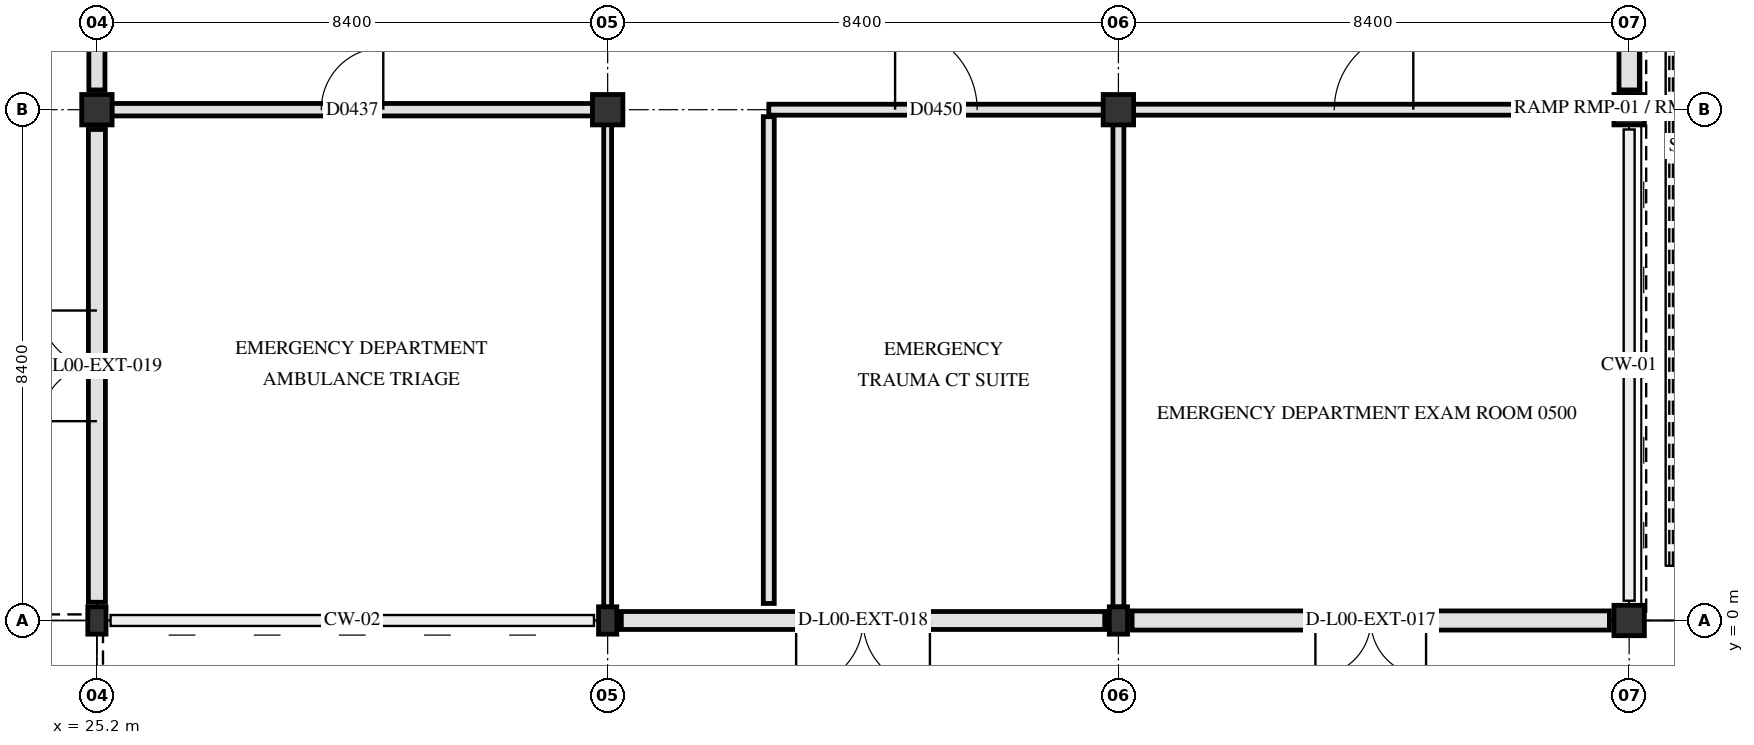
"""IFC4 building model, lengths in metres.
Left out: names, types, materials, properties, quantities, classifications, styles, units other than length and angle.
Written with IfcOpenShell. Run it as: python <this file> out.ifc"""

import sys

from ifc_helpers import new_model, si_unit, direction, frame, frame_2d, origin, origin_2d, place, context, subcontext, project, spatial, rectangle, i_section, extrude, element, fill, save


model = new_model("IFC4")
c1 = context("Model", 3, precision=1e-05, world=origin(), true_north=direction((0.0, 1.0)))
c2 = subcontext(c1, "Body", "Model", "MODEL_VIEW")
j1 = project(units=[si_unit("LENGTHUNIT", "METRE"), si_unit("PLANEANGLEUNIT", "RADIAN")], contexts=[c1])
p1 = place(None, origin())
s1 = spatial("IfcSite", under=j1, at=p1, CompositionType="ELEMENT")
p2 = place(p1, origin())
s2 = spatial("IfcBuilding", under=s1, at=p2, CompositionType="ELEMENT")
p3 = place(p2, origin())
s3 = spatial("IfcBuildingStorey", under=s2, at=p3, CompositionType="ELEMENT", Elevation=0.0)
p4 = place(p3, frame((25.2, 0.0, 0.0), z_axis=(0.0, 0.0, 1.0), x_axis=(1.0, 0.0, 0.0)))
e1 = element("IfcColumn", 1, at=p4, inside=s3, PredefinedType="COLUMN", context=c2, shape_type="SweptSolid", body=[
    extrude(i_section(OverallWidth=0.3, OverallDepth=0.45, WebThickness=0.014, FlangeThickness=0.026, FilletRadius=0.027, at=origin_2d()), origin(), (0.0, 0.0, 1.0), 4.8),
])
p5 = place(p3, frame((25.2, 8.4, 0.0), z_axis=(0.0, 0.0, 1.0), x_axis=(1.0, 0.0, 0.0)))
e2 = element("IfcColumn", 2, at=p5, inside=s3, PredefinedType="COLUMN", context=c2, shape_type="SweptSolid", body=[
    extrude(rectangle(XDim=0.5, YDim=0.5, at=origin_2d()), origin(), (0.0, 0.0, 1.0), 4.8),
])
p6 = place(p3, frame((33.6, 0.0, 0.0), z_axis=(0.0, 0.0, 1.0), x_axis=(1.0, 0.0, 0.0)))
e3 = element("IfcColumn", 3, at=p6, inside=s3, PredefinedType="COLUMN", context=c2, shape_type="SweptSolid", body=[
    extrude(i_section(OverallWidth=0.3, OverallDepth=0.45, WebThickness=0.014, FlangeThickness=0.026, FilletRadius=0.027, at=origin_2d()), origin(), (0.0, 0.0, 1.0), 4.8),
])
p7 = place(p3, frame((33.6, 8.4, 0.0), z_axis=(0.0, 0.0, 1.0), x_axis=(1.0, 0.0, 0.0)))
e4 = element("IfcColumn", 4, at=p7, inside=s3, PredefinedType="COLUMN", context=c2, shape_type="SweptSolid", body=[
    extrude(rectangle(XDim=0.5, YDim=0.5, at=origin_2d()), origin(), (0.0, 0.0, 1.0), 4.8),
])
p8 = place(p3, frame((42.0, 0.0, 0.0), z_axis=(0.0, 0.0, 1.0), x_axis=(1.0, 0.0, 0.0)))
e5 = element("IfcColumn", 5, at=p8, inside=s3, PredefinedType="COLUMN", context=c2, shape_type="SweptSolid", body=[
    extrude(i_section(OverallWidth=0.3, OverallDepth=0.45, WebThickness=0.014, FlangeThickness=0.026, FilletRadius=0.027, at=origin_2d()), origin(), (0.0, 0.0, 1.0), 4.8),
])
for number, where, z_axis, x_axis in (
    (6, (42.0, 8.4, 0.0), (0.0, 0.0, 1.0), (1.0, 0.0, 0.0)),
    (7, (50.4, 0.0, 0.0), (0.0, 0.0, 1.0), (1.0, 0.0, 0.0)),
    (8, (50.4, 8.4, 0.0), (0.0, 0.0, 1.0), (1.0, 0.0, 0.0)),
):
    element("IfcColumn", number, at=place(p3, frame(where, z_axis=z_axis, x_axis=x_axis)), inside=s3, PredefinedType="COLUMN", context=c2, shape_type="SweptSolid", body=[
        extrude(rectangle(XDim=0.5, YDim=0.5, at=origin_2d()), origin(), (0.0, 0.0, 1.0), 4.8),
    ])
p9 = place(p3, frame((50.4, 16.471, 0.0), z_axis=(0.0, 0.0, 1.0), x_axis=(0.0, -1.0, 0.0)))
e9 = element("IfcWall", 9, at=p9, inside=s3, PredefinedType="SOLIDWALL", context=c2, shape_type="SweptSolid", body=[
    extrude(rectangle(XDim=7.746, YDim=0.335, at=frame_2d((3.873, 0.0))), origin(), (0.0, 0.0, 1.0), 3.79),
])
p10 = place(p9, frame((1.362, 0.0, 0.85)))
e10 = element("IfcOpeningElement", 10, at=p10, cuts=e9, PredefinedType="OPENING", context=c2, shape_type="SweptSolid", body=[
    extrude(rectangle(XDim=1.15, YDim=1.54, at=frame_2d((0.575, 0.77))), frame((0.0, 0.177, 0.0), z_axis=(0.0, -1.0, 0.0), x_axis=(1.0, 0.0, 0.0)), (0.0, 0.0, 1.0), 0.355),
])
p11 = place(p9, frame((5.185, 0.0, 0.85)))
e11 = element("IfcOpeningElement", 11, at=p11, cuts=e9, PredefinedType="OPENING", context=c2, shape_type="SweptSolid", body=[
    extrude(rectangle(XDim=1.25, YDim=1.54, at=frame_2d((0.625, 0.77))), frame((0.0, 0.177, 0.0), z_axis=(0.0, -1.0, 0.0), x_axis=(1.0, 0.0, 0.0)), (0.0, 0.0, 1.0), 0.355),
])
p12 = place(p3, frame((50.075, 0.0, 0.0), z_axis=(0.0, 0.0, 1.0), x_axis=(-1.0, 0.0, 0.0)))
e12 = element("IfcWall", 12, at=p12, inside=s3, PredefinedType="SOLIDWALL", context=c2, shape_type="SweptSolid", body=[
    extrude(rectangle(XDim=7.85, YDim=0.315, at=frame_2d((3.925, 0.0))), origin(), (0.0, 0.0, 1.0), 3.79),
])
p13 = place(p12, frame((3.015, 0.0, 0.0)))
e13 = element("IfcOpeningElement", 13, at=p13, cuts=e12, PredefinedType="OPENING", context=c2, shape_type="SweptSolid", body=[
    extrude(rectangle(XDim=1.82, YDim=2.28, at=frame_2d((0.91, 1.14))), frame((0.0, 0.167, 0.0), z_axis=(0.0, -1.0, 0.0), x_axis=(1.0, 0.0, 0.0)), (0.0, 0.0, 1.0), 0.335),
])
p14 = place(p3, frame((41.775, 0.0, 0.0), z_axis=(0.0, 0.0, 1.0), x_axis=(-1.0, 0.0, 0.0)))
e14 = element("IfcWall", 14, at=p14, inside=s3, PredefinedType="SOLIDWALL", context=c2, shape_type="SweptSolid", body=[
    extrude(rectangle(XDim=7.95, YDim=0.295, at=frame_2d((3.975, 0.0))), origin(), (0.0, 0.0, 1.0), 3.79),
])
p15 = place(p14, frame((2.875, 0.0, 0.0)))
e15 = element("IfcOpeningElement", 15, at=p15, cuts=e14, PredefinedType="OPENING", context=c2, shape_type="SweptSolid", body=[
    extrude(rectangle(XDim=2.2, YDim=2.35, at=frame_2d((1.1, 1.175))), frame((0.0, 0.157, 0.0), z_axis=(0.0, -1.0, 0.0), x_axis=(1.0, 0.0, 0.0)), (0.0, 0.0, 1.0), 0.315),
])
p16 = place(p3, frame((25.2, 0.3, 0.0), z_axis=(0.0, 0.0, 1.0), x_axis=(0.0, 1.0, 0.0)))
e16 = element("IfcWall", 16, at=p16, inside=s3, PredefinedType="SOLIDWALL", context=c2, shape_type="SweptSolid", body=[
    extrude(rectangle(XDim=7.775, YDim=0.28, at=frame_2d((3.887, 0.0))), origin(), (0.0, 0.0, 1.0), 2.99),
])
p17 = place(p16, frame((2.978, 0.0, 0.0)))
e17 = element("IfcOpeningElement", 17, at=p17, cuts=e16, PredefinedType="OPENING", context=c2, shape_type="SweptSolid", body=[
    extrude(rectangle(XDim=1.82, YDim=2.28, at=frame_2d((0.91, 1.14))), frame((0.0, 0.15, 0.0), z_axis=(0.0, -1.0, 0.0), x_axis=(1.0, 0.0, 0.0)), (0.0, 0.0, 1.0), 0.3),
])
p18 = place(p3, frame((25.2, 8.725, 0.0), z_axis=(0.0, 0.0, 1.0), x_axis=(0.0, 1.0, 0.0)))
e18 = element("IfcWall", 18, at=p18, inside=s3, PredefinedType="SOLIDWALL", context=c2, shape_type="SweptSolid", body=[
    extrude(rectangle(XDim=7.75, YDim=0.265, at=frame_2d((3.875, 0.0))), origin(), (0.0, 0.0, 1.0), 2.99),
])
p19 = place(p18, frame((2.775, 0.0, 0.0)))
e19 = element("IfcOpeningElement", 19, at=p19, cuts=e18, PredefinedType="OPENING", context=c2, shape_type="SweptSolid", body=[
    extrude(rectangle(XDim=2.2, YDim=2.35, at=frame_2d((1.1, 1.175))), frame((0.0, 0.142, 0.0), z_axis=(0.0, -1.0, 0.0), x_axis=(1.0, 0.0, 0.0)), (0.0, 0.0, 1.0), 0.285),
])
p20 = place(p3, frame((25.445, 8.4, 0.0), z_axis=(0.0, 0.0, 1.0), x_axis=(1.0, 0.0, 0.0)))
e20 = element("IfcWall", 20, at=p20, inside=s3, PredefinedType="PARTITIONING", context=c2, shape_type="SweptSolid", body=[
    extrude(rectangle(XDim=7.91, YDim=0.205, at=frame_2d((3.955, 0.0))), origin(), (0.0, 0.0, 1.0), 3.84),
])
p21 = place(p20, frame((3.445, 0.0, 0.0)))
e21 = element("IfcOpeningElement", 21, at=p21, cuts=e20, PredefinedType="OPENING", context=c2, shape_type="SweptSolid", body=[
    extrude(rectangle(XDim=1.02, YDim=2.12, at=frame_2d((0.51, 1.06))), frame((0.0, 0.113, 0.0), z_axis=(0.0, -1.0, 0.0), x_axis=(1.0, 0.0, 0.0)), (0.0, 0.0, 1.0), 0.225),
])
p22 = place(p3, frame((36.25, 8.4, 0.0), z_axis=(0.0, 0.0, 1.0), x_axis=(1.0, 0.0, 0.0)))
e22 = element("IfcWall", 22, at=p22, inside=s3, PredefinedType="PARTITIONING", context=c2, shape_type="SweptSolid", body=[
    extrude(rectangle(XDim=5.505, YDim=0.18, at=frame_2d((2.752, 0.0))), origin(), (0.0, 0.0, 1.0), 3.84),
])
p23 = place(p22, frame((2.077, 0.0, 0.0)))
e23 = element("IfcOpeningElement", 23, at=p23, cuts=e22, PredefinedType="OPENING", context=c2, shape_type="SweptSolid", body=[
    extrude(rectangle(XDim=1.35, YDim=2.2, at=frame_2d((0.675, 1.1))), frame((0.0, 0.1, 0.0), z_axis=(0.0, -1.0, 0.0), x_axis=(1.0, 0.0, 0.0)), (0.0, 0.0, 1.0), 0.2),
])
p24 = place(p3, frame((42.245, 8.4, 0.0), z_axis=(0.0, 0.0, 1.0), x_axis=(1.0, 0.0, 0.0)))
e24 = element("IfcWall", 24, at=p24, inside=s3, PredefinedType="PARTITIONING", context=c2, shape_type="SweptSolid", body=[
    extrude(rectangle(XDim=7.91, YDim=0.18, at=frame_2d((3.955, 0.0))), origin(), (0.0, 0.0, 1.0), 3.84),
])
p25 = place(p24, frame((3.305, 0.0, 0.0)))
e25 = element("IfcOpeningElement", 25, at=p25, cuts=e24, PredefinedType="OPENING", context=c2, shape_type="SweptSolid", body=[
    extrude(rectangle(XDim=1.3, YDim=2.2, at=frame_2d((0.65, 1.1))), frame((0.0, 0.1, 0.0), z_axis=(0.0, -1.0, 0.0), x_axis=(1.0, 0.0, 0.0)), (0.0, 0.0, 1.0), 0.2),
])
p26 = place(p3, frame((33.6, 0.22, 0.0), z_axis=(0.0, 0.0, 1.0), x_axis=(0.0, 1.0, 0.0)))
e26 = element("IfcWall", 26, at=p26, inside=s3, PredefinedType="PARTITIONING", context=c2, shape_type="SweptSolid", body=[
    extrude(rectangle(XDim=7.935, YDim=0.13, at=frame_2d((3.968, 0.0))), origin(), (0.0, 0.0, 1.0), 3.89),
])
p27 = place(p3, frame((36.25, 0.28, 0.0), z_axis=(0.0, 0.0, 1.0), x_axis=(0.0, 1.0, 0.0)))
e27 = element("IfcWall", 27, at=p27, inside=s3, PredefinedType="PARTITIONING", context=c2, shape_type="SweptSolid", body=[
    extrude(rectangle(XDim=8.005, YDim=0.18, at=frame_2d((4.002, 0.0))), origin(), (0.0, 0.0, 1.0), 3.84),
])
p28 = place(p3, frame((42.0, 0.22, 0.0), z_axis=(0.0, 0.0, 1.0), x_axis=(0.0, 1.0, 0.0)))
e28 = element("IfcWall", 28, at=p28, inside=s3, PredefinedType="PARTITIONING", context=c2, shape_type="SweptSolid", body=[
    extrude(rectangle(XDim=7.935, YDim=0.18, at=frame_2d((3.968, 0.0))), origin(), (0.0, 0.0, 1.0), 3.89),
])
p29 = place(p13, origin())
e29 = element("IfcDoor", 29, at=p29, inside=s3, OperationType="DOUBLE_SWING_LEFT", PredefinedType="DOOR", context=c2, shape_type="SweptSolid", body=[
    extrude(rectangle(XDim=1.82, YDim=2.28, at=frame_2d((0.91, 1.14))), frame((0.0, 0.025, 0.0), z_axis=(0.0, -1.0, 0.0), x_axis=(1.0, 0.0, 0.0)), (0.0, 0.0, 1.0), 0.05),
])
fill(e13, e29)
p30 = place(p15, origin())
e30 = element("IfcDoor", 30, at=p30, inside=s3, OperationType="DOUBLE_SWING_LEFT", PredefinedType="DOOR", context=c2, shape_type="SweptSolid", body=[
    extrude(rectangle(XDim=2.2, YDim=2.35, at=frame_2d((1.1, 1.175))), frame((0.0, 0.025, 0.0), z_axis=(0.0, -1.0, 0.0), x_axis=(1.0, 0.0, 0.0)), (0.0, 0.0, 1.0), 0.05),
])
fill(e15, e30)
p31 = place(p17, origin())
e31 = element("IfcDoor", 31, at=p31, inside=s3, OperationType="DOUBLE_SWING_LEFT", PredefinedType="DOOR", context=c2, shape_type="SweptSolid", body=[
    extrude(rectangle(XDim=1.82, YDim=2.28, at=frame_2d((0.91, 1.14))), frame((0.0, 0.025, 0.0), z_axis=(0.0, -1.0, 0.0), x_axis=(1.0, 0.0, 0.0)), (0.0, 0.0, 1.0), 0.05),
])
fill(e17, e31)
p32 = place(p21, origin())
e32 = element("IfcDoor", 32, at=p32, inside=s3, OperationType="SINGLE_SWING_RIGHT", PredefinedType="DOOR", context=c2, shape_type="SweptSolid", body=[
    extrude(rectangle(XDim=1.02, YDim=2.12, at=frame_2d((0.51, 1.06))), frame((0.0, 0.025, 0.0), z_axis=(0.0, -1.0, 0.0), x_axis=(1.0, 0.0, 0.0)), (0.0, 0.0, 1.0), 0.05),
])
fill(e21, e32)
p33 = place(p23, origin())
e33 = element("IfcDoor", 33, at=p33, inside=s3, OperationType="SINGLE_SWING_LEFT", PredefinedType="DOOR", context=c2, shape_type="SweptSolid", body=[
    extrude(rectangle(XDim=1.35, YDim=2.2, at=frame_2d((0.675, 1.1))), frame((0.0, 0.025, 0.0), z_axis=(0.0, -1.0, 0.0), x_axis=(1.0, 0.0, 0.0)), (0.0, 0.0, 1.0), 0.05),
])
fill(e23, e33)
p34 = place(p25, origin())
e34 = element("IfcDoor", 34, at=p34, inside=s3, OperationType="SINGLE_SWING_RIGHT", PredefinedType="DOOR", context=c2, shape_type="SweptSolid", body=[
    extrude(rectangle(XDim=1.3, YDim=2.2, at=frame_2d((0.65, 1.1))), frame((0.0, 0.025, 0.0), z_axis=(0.0, -1.0, 0.0), x_axis=(1.0, 0.0, 0.0)), (0.0, 0.0, 1.0), 0.05),
])
fill(e25, e34)
save(model, sys.argv[1])
